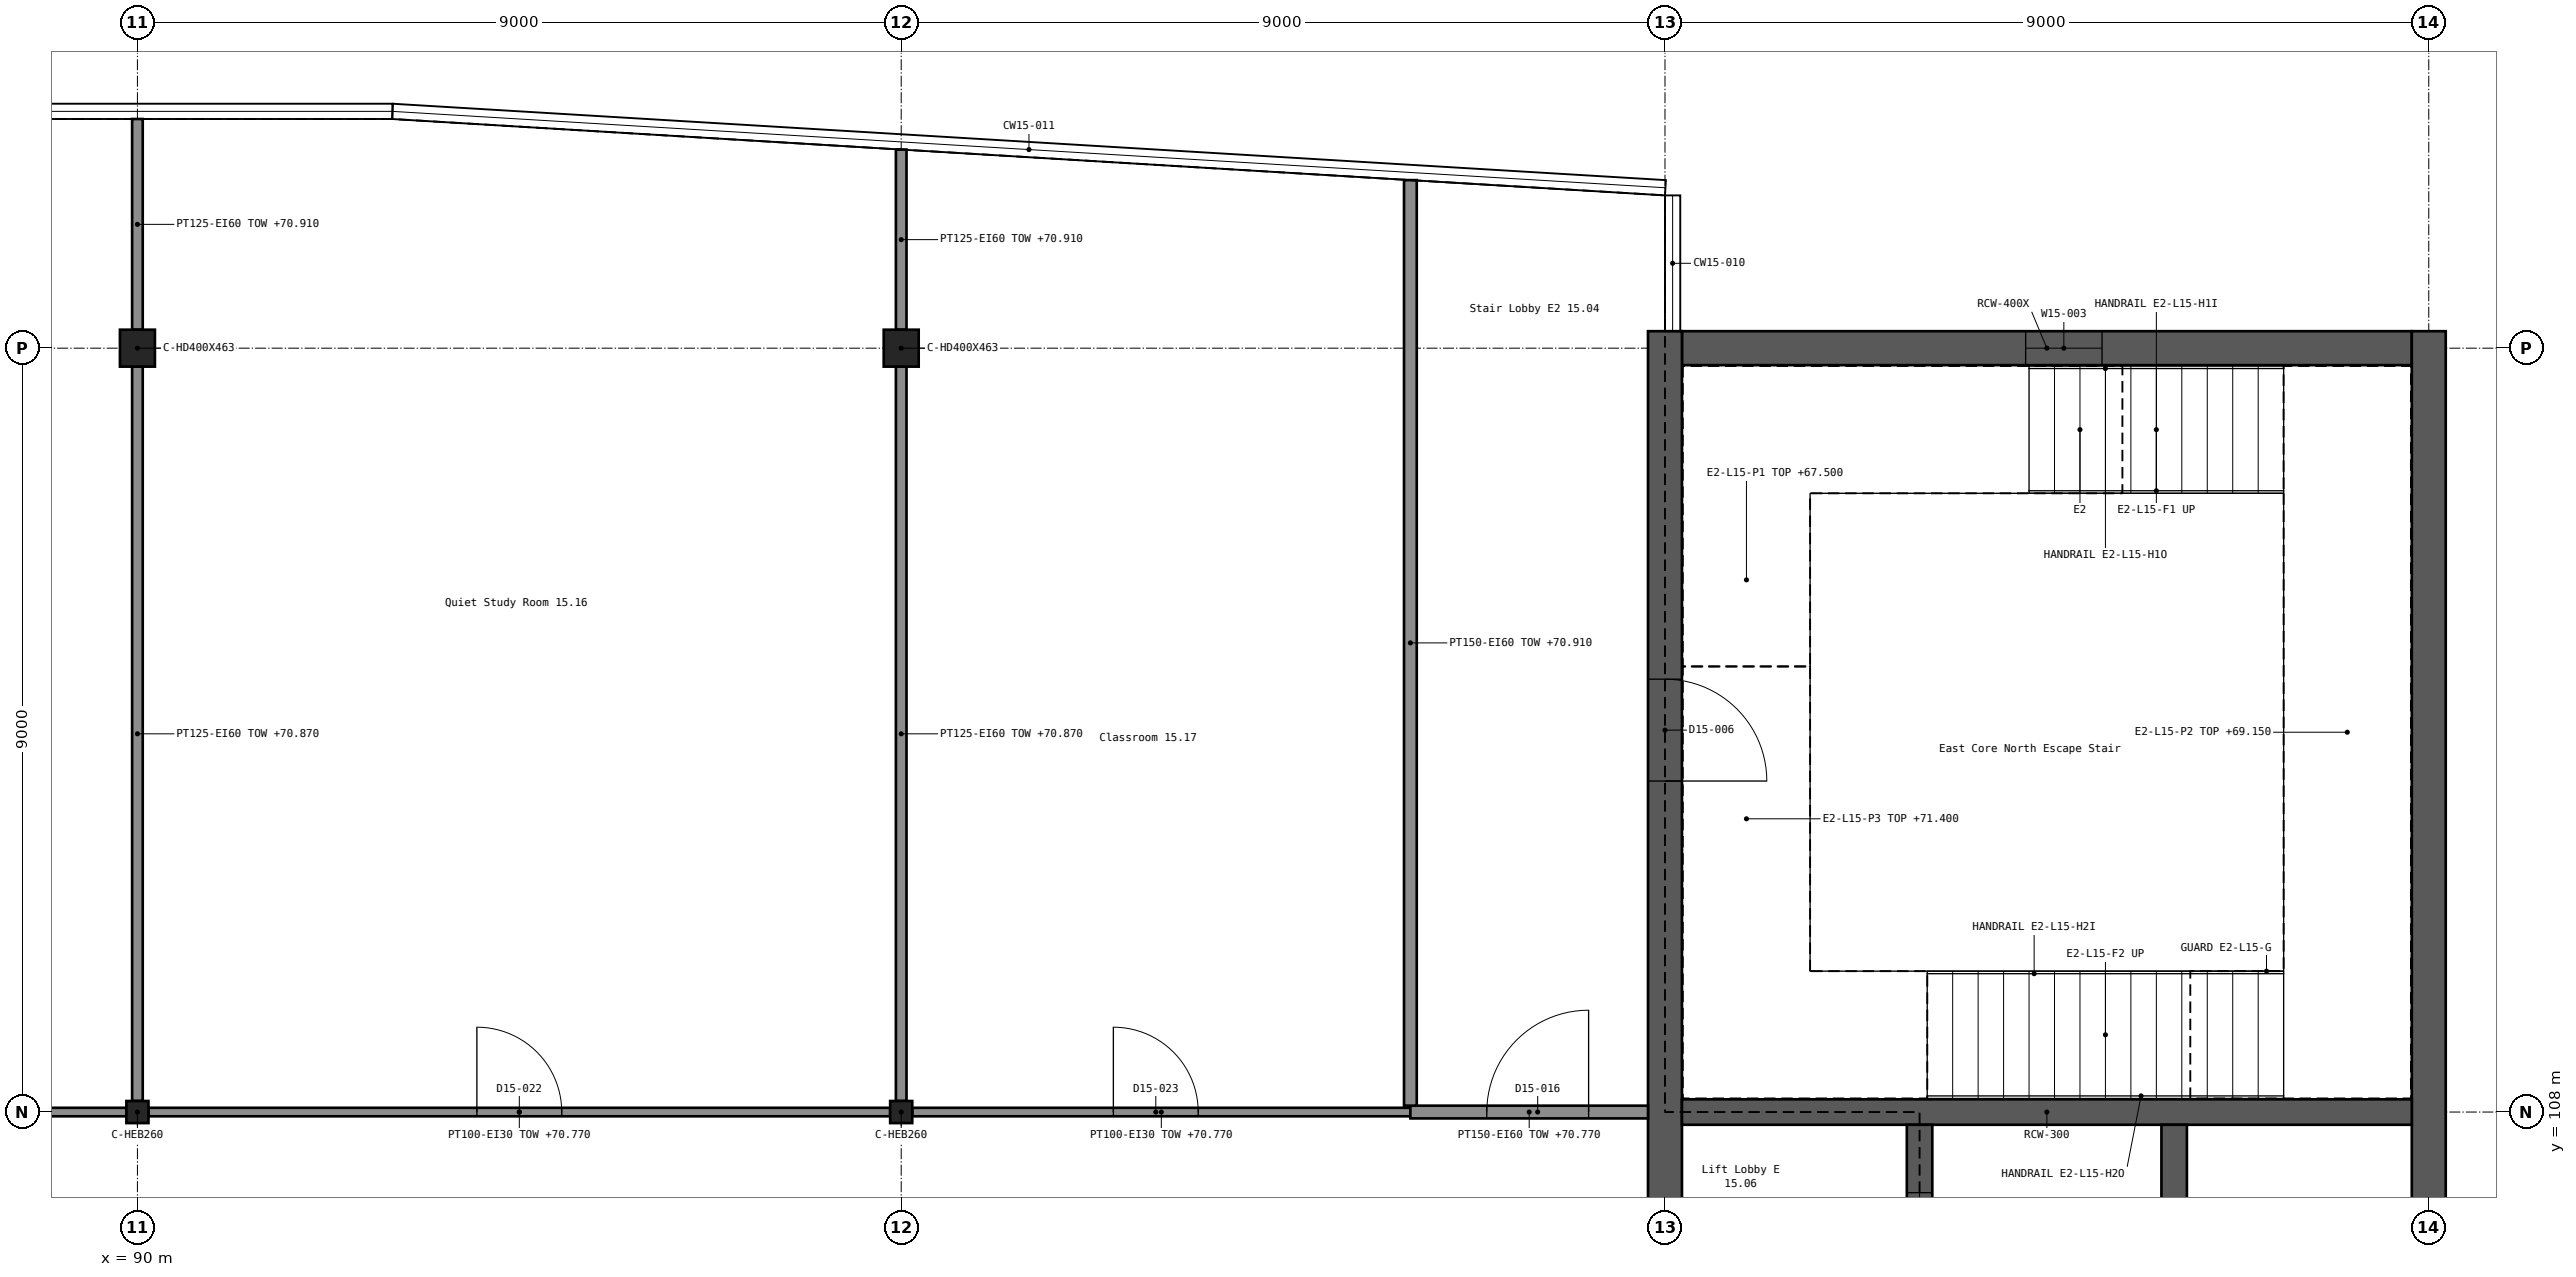
"""IFC4 building model, lengths in metres.
Left out: names, types, materials, properties, quantities, classifications, styles, units other than length and angle.
Written with IfcOpenShell. Run it as: python <this file> out.ifc"""

import sys

from ifc_helpers import new_model, si_unit, direction, frame, frame_2d, origin, origin_2d, place, context, subcontext, project, spatial, rectangle, i_section, extrude, element, fill, save


model = new_model("IFC4")
c1 = context("Model", 3, precision=1e-05, world=origin(), true_north=direction((0.0, 1.0)))
c2 = subcontext(c1, "Body", "Model", "MODEL_VIEW")
j1 = project(units=[si_unit("LENGTHUNIT", "METRE"), si_unit("PLANEANGLEUNIT", "RADIAN")], contexts=[c1])
p1 = place(None, origin())
s1 = spatial("IfcSite", under=j1, at=p1, CompositionType="ELEMENT")
p2 = place(p1, origin())
s2 = spatial("IfcBuilding", under=s1, at=p2, CompositionType="ELEMENT")
p3 = place(p2, frame((0.0, 0.0, 67.5)))
s3 = spatial("IfcBuildingStorey", under=s2, at=p3, CompositionType="ELEMENT", Elevation=67.5)
p4 = place(p3, frame((108.2, 117.0, 0.0), z_axis=(0.0, 0.0, 1.0), x_axis=(1.0, 0.0, 0.0)))
e1 = element("IfcWall", 1, at=p4, inside=s3, PredefinedType="SHEAR", context=c2, shape_type="SweptSolid", body=[
    extrude(rectangle(XDim=8.6, YDim=0.4, at=frame_2d((4.3, 0.0))), origin(), (0.0, 0.0, 1.0), 3.9),
])
p5 = place(p4, frame((4.05, 0.0, 1.2)))
e2 = element("IfcOpeningElement", 2, at=p5, cuts=e1, PredefinedType="OPENING", context=c2, shape_type="SweptSolid", body=[
    extrude(rectangle(XDim=0.9, YDim=1.5, at=frame_2d((0.45, 0.75))), frame((0.0, 0.211, 0.0), z_axis=(0.0, -1.0, 0.0), x_axis=(1.0, 0.0, 0.0)), (0.0, 0.0, 1.0), 0.422),
])
p6 = place(p3, frame((108.0, 89.8, 0.0), z_axis=(0.0, 0.0, 1.0), x_axis=(0.0, 1.0, 0.0)))
e3 = element("IfcWall", 3, at=p6, inside=s3, PredefinedType="SHEAR", context=c2, shape_type="SweptSolid", body=[
    extrude(rectangle(XDim=27.4, YDim=0.4, at=frame_2d((13.7, 0.0))), origin(), (0.0, 0.0, 1.0), 3.9),
])
p7 = place(p6, frame((4.1, 0.0, 0.0)))
e4 = element("IfcOpeningElement", 4, at=p7, cuts=e3, PredefinedType="OPENING", context=c2, shape_type="SweptSolid", body=[
    extrude(rectangle(XDim=1.2, YDim=2.1, at=frame_2d((0.6, 1.05))), frame((0.0, 0.211, 0.0), z_axis=(0.0, -1.0, 0.0), x_axis=(1.0, 0.0, 0.0)), (0.0, 0.0, 1.0), 0.422),
])
p8 = place(p6, frame((22.1, 0.0, 0.0)))
e5 = element("IfcOpeningElement", 5, at=p8, cuts=e3, PredefinedType="OPENING", context=c2, shape_type="SweptSolid", body=[
    extrude(rectangle(XDim=1.2, YDim=2.1, at=frame_2d((0.6, 1.05))), frame((0.0, 0.211, 0.0), z_axis=(0.0, -1.0, 0.0), x_axis=(1.0, 0.0, 0.0)), (0.0, 0.0, 1.0), 0.422),
])
p9 = place(p6, frame((12.5, 0.0, 0.0)))
e6 = element("IfcOpeningElement", 6, at=p9, cuts=e3, PredefinedType="OPENING", context=c2, shape_type="SweptSolid", body=[
    extrude(rectangle(XDim=2.0, YDim=2.1, at=frame_2d((1.0, 1.05))), frame((0.0, 0.211, 0.0), z_axis=(0.0, -1.0, 0.0), x_axis=(1.0, 0.0, 0.0)), (0.0, 0.0, 1.0), 0.422),
])
p10 = place(p3, frame((117.0, 89.8, 0.0), z_axis=(0.0, 0.0, 1.0), x_axis=(0.0, 1.0, 0.0)))
e7 = element("IfcWall", 7, at=p10, inside=s3, PredefinedType="SHEAR", context=c2, shape_type="SweptSolid", body=[
    extrude(rectangle(XDim=27.4, YDim=0.4, at=frame_2d((13.7, 0.0))), origin(), (0.0, 0.0, 1.0), 3.9),
])
p11 = place(p3, frame((108.2, 108.0, 0.0), z_axis=(0.0, 0.0, 1.0), x_axis=(1.0, 0.0, 0.0)))
e8 = element("IfcWall", 8, at=p11, inside=s3, PredefinedType="SHEAR", context=c2, shape_type="SweptSolid", body=[
    extrude(rectangle(XDim=8.6, YDim=0.3, at=frame_2d((4.3, 0.0))), origin(), (0.0, 0.0, 1.0), 3.9),
])
p12 = place(p3, frame((111.0, 99.15, 0.0), z_axis=(0.0, 0.0, 1.0), x_axis=(0.0, 1.0, 0.0)))
e9 = element("IfcWall", 9, at=p12, inside=s3, PredefinedType="SHEAR", context=c2, shape_type="SweptSolid", body=[
    extrude(rectangle(XDim=8.7, YDim=0.3, at=frame_2d((4.35, 0.0))), origin(), (0.0, 0.0, 1.0), 3.9),
])
p13 = place(p12, frame((0.8, 0.0, 0.0)))
e10 = element("IfcOpeningElement", 10, at=p13, cuts=e9, PredefinedType="OPENING", context=c2, shape_type="SweptSolid", body=[
    extrude(rectangle(XDim=1.1, YDim=2.1, at=frame_2d((0.55, 1.05))), frame((0.0, 0.161, 0.0), z_axis=(0.0, -1.0, 0.0), x_axis=(1.0, 0.0, 0.0)), (0.0, 0.0, 1.0), 0.322),
])
p14 = place(p12, frame((3.8, 0.0, 0.0)))
e11 = element("IfcOpeningElement", 11, at=p14, cuts=e9, PredefinedType="OPENING", context=c2, shape_type="SweptSolid", body=[
    extrude(rectangle(XDim=1.1, YDim=2.1, at=frame_2d((0.55, 1.05))), frame((0.0, 0.161, 0.0), z_axis=(0.0, -1.0, 0.0), x_axis=(1.0, 0.0, 0.0)), (0.0, 0.0, 1.0), 0.322),
])
p15 = place(p12, frame((6.8, 0.0, 0.0)))
e12 = element("IfcOpeningElement", 12, at=p15, cuts=e9, PredefinedType="OPENING", context=c2, shape_type="SweptSolid", body=[
    extrude(rectangle(XDim=1.1, YDim=2.1, at=frame_2d((0.55, 1.05))), frame((0.0, 0.161, 0.0), z_axis=(0.0, -1.0, 0.0), x_axis=(1.0, 0.0, 0.0)), (0.0, 0.0, 1.0), 0.322),
])
p16 = place(p3, frame((114.0, 99.15, 0.0), z_axis=(0.0, 0.0, 1.0), x_axis=(0.0, 1.0, 0.0)))
e13 = element("IfcWall", 13, at=p16, inside=s3, PredefinedType="SHEAR", context=c2, shape_type="SweptSolid", body=[
    extrude(rectangle(XDim=8.7, YDim=0.3, at=frame_2d((4.35, 0.0))), origin(), (0.0, 0.0, 1.0), 3.9),
])
for number, where, z_axis, x_axis in (
    (14, (90.0, 108.0, 0.0), (0.0, 0.0, 1.0), (1.0, 0.0, 0.0)),
    (15, (99.0, 108.0, 0.0), (0.0, 0.0, 1.0), (1.0, 0.0, 0.0)),
):
    element("IfcColumn", number, at=place(p3, frame(where, z_axis=z_axis, x_axis=x_axis)), inside=s3, PredefinedType="COLUMN", context=c2, shape_type="SweptSolid", body=[
        extrude(i_section(OverallWidth=0.26, OverallDepth=0.26, WebThickness=0.01, FlangeThickness=0.018, FilletRadius=0.024, at=origin_2d()), origin(), (0.0, 0.0, 1.0), 3.9),
    ])
for number, where, z_axis, x_axis in (
    (16, (90.0, 117.0, 0.0), (0.0, 0.0, 1.0), (1.0, 0.0, 0.0)),
    (17, (99.0, 117.0, 0.0), (0.0, 0.0, 1.0), (1.0, 0.0, 0.0)),
):
    element("IfcColumn", number, at=place(p3, frame(where, z_axis=z_axis, x_axis=x_axis)), inside=s3, PredefinedType="COLUMN", context=c2, shape_type="SweptSolid", body=[
        extrude(i_section(OverallWidth=0.412, OverallDepth=0.435, WebThickness=0.036, FlangeThickness=0.057, FilletRadius=0.015, at=origin_2d()), origin(), (0.0, 0.0, 1.0), 3.9),
    ])
p17 = place(p3, frame((81.13, 108.0, 0.0), z_axis=(0.0, 0.0, 1.0), x_axis=(1.0, 0.0, 0.0)))
e18 = element("IfcWall", 18, at=p17, inside=s3, PredefinedType="PARTITIONING", context=c2, shape_type="SweptSolid", body=[
    extrude(rectangle(XDim=8.74, YDim=0.1, at=frame_2d((4.37, 0.0))), origin(), (0.0, 0.0, 1.0), 3.27),
])
p18 = place(p17, frame((5.845, 0.0, 0.0)))
e19 = element("IfcOpeningElement", 19, at=p18, cuts=e18, PredefinedType="OPENING", context=c2, shape_type="SweptSolid", body=[
    extrude(rectangle(XDim=1.8, YDim=2.1, at=frame_2d((0.9, 1.05))), frame((0.0, 0.061, 0.0), z_axis=(0.0, -1.0, 0.0), x_axis=(1.0, 0.0, 0.0)), (0.0, 0.0, 1.0), 0.122),
])
p19 = place(p3, frame((90.13, 108.0, 0.0), z_axis=(0.0, 0.0, 1.0), x_axis=(1.0, 0.0, 0.0)))
e20 = element("IfcWall", 20, at=p19, inside=s3, PredefinedType="PARTITIONING", context=c2, shape_type="SweptSolid", body=[
    extrude(rectangle(XDim=8.74, YDim=0.1, at=frame_2d((4.37, 0.0))), origin(), (0.0, 0.0, 1.0), 3.27),
])
p20 = place(p19, frame((3.87, 0.0, 0.0)))
e21 = element("IfcOpeningElement", 21, at=p20, cuts=e20, PredefinedType="OPENING", context=c2, shape_type="SweptSolid", body=[
    extrude(rectangle(XDim=1.0, YDim=2.1, at=frame_2d((0.5, 1.05))), frame((0.0, 0.061, 0.0), z_axis=(0.0, -1.0, 0.0), x_axis=(1.0, 0.0, 0.0)), (0.0, 0.0, 1.0), 0.122),
])
p21 = place(p3, frame((99.13, 108.0, 0.0), z_axis=(0.0, 0.0, 1.0), x_axis=(1.0, 0.0, 0.0)))
e22 = element("IfcWall", 22, at=p21, inside=s3, PredefinedType="PARTITIONING", context=c2, shape_type="SweptSolid", body=[
    extrude(rectangle(XDim=5.87, YDim=0.1, at=frame_2d((2.935, 0.0))), origin(), (0.0, 0.0, 1.0), 3.27),
])
p22 = place(p21, frame((2.37, 0.0, 0.0)))
e23 = element("IfcOpeningElement", 23, at=p22, cuts=e22, PredefinedType="OPENING", context=c2, shape_type="SweptSolid", body=[
    extrude(rectangle(XDim=1.0, YDim=2.1, at=frame_2d((0.5, 1.05))), frame((0.0, 0.061, 0.0), z_axis=(0.0, -1.0, 0.0), x_axis=(1.0, 0.0, 0.0)), (0.0, 0.0, 1.0), 0.122),
])
p23 = place(p3, frame((105.0, 108.0, 0.0), z_axis=(0.0, 0.0, 1.0), x_axis=(1.0, 0.0, 0.0)))
e24 = element("IfcWall", 24, at=p23, inside=s3, PredefinedType="PARTITIONING", context=c2, shape_type="SweptSolid", body=[
    extrude(rectangle(XDim=2.8, YDim=0.15, at=frame_2d((1.4, 0.0))), origin(), (0.0, 0.0, 1.0), 3.27),
])
p24 = place(p23, frame((0.9, 0.0, 0.0)))
e25 = element("IfcOpeningElement", 25, at=p24, cuts=e24, PredefinedType="OPENING", context=c2, shape_type="SweptSolid", body=[
    extrude(rectangle(XDim=1.2, YDim=2.1, at=frame_2d((0.6, 1.05))), frame((0.0, 0.086, 0.0), z_axis=(0.0, -1.0, 0.0), x_axis=(1.0, 0.0, 0.0)), (0.0, 0.0, 1.0), 0.172),
])
p25 = place(p3, frame((90.0, 108.13, 0.0), z_axis=(0.0, 0.0, 1.0), x_axis=(0.0, 1.0, 0.0)))
e26 = element("IfcWall", 26, at=p25, inside=s3, PredefinedType="PARTITIONING", context=c2, shape_type="SweptSolid", body=[
    extrude(rectangle(XDim=8.653, YDim=0.125, at=frame_2d((4.326, 0.0))), origin(), (0.0, 0.0, 1.0), 3.37),
])
p26 = place(p3, frame((90.0, 117.218, 0.0), z_axis=(0.0, 0.0, 1.0), x_axis=(0.0, 1.0, 0.0)))
e27 = element("IfcWall", 27, at=p26, inside=s3, PredefinedType="PARTITIONING", context=c2, shape_type="SweptSolid", body=[
    extrude(rectangle(XDim=2.482, YDim=0.125, at=frame_2d((1.241, 0.0))), origin(), (0.0, 0.0, 1.0), 3.41),
])
p27 = place(p3, frame((99.0, 108.13, 0.0), z_axis=(0.0, 0.0, 1.0), x_axis=(0.0, 1.0, 0.0)))
e28 = element("IfcWall", 28, at=p27, inside=s3, PredefinedType="PARTITIONING", context=c2, shape_type="SweptSolid", body=[
    extrude(rectangle(XDim=8.653, YDim=0.125, at=frame_2d((4.326, 0.0))), origin(), (0.0, 0.0, 1.0), 3.37),
])
p28 = place(p3, frame((99.0, 117.218, 0.0), z_axis=(0.0, 0.0, 1.0), x_axis=(0.0, 1.0, 0.0)))
e29 = element("IfcWall", 29, at=p28, inside=s3, PredefinedType="PARTITIONING", context=c2, shape_type="SweptSolid", body=[
    extrude(rectangle(XDim=2.123, YDim=0.125, at=frame_2d((1.061, 0.0))), origin(), (0.0, 0.0, 1.0), 3.41),
])
p29 = place(p3, frame((105.0, 108.075, 0.0), z_axis=(0.0, 0.0, 1.0), x_axis=(0.0, 1.0, 0.0)))
e30 = element("IfcWall", 30, at=p29, inside=s3, PredefinedType="PARTITIONING", context=c2, shape_type="SweptSolid", body=[
    extrude(rectangle(XDim=10.905, YDim=0.15, at=frame_2d((5.453, 0.0))), origin(), (0.0, 0.0, 1.0), 3.41),
])
p30 = place(p5, origin())
e31 = element("IfcWindow", 31, at=p30, inside=s3, PartitioningType="SINGLE_PANEL", PredefinedType="WINDOW", context=c2, shape_type="SweptSolid", body=[
    extrude(rectangle(XDim=0.9, YDim=1.5, at=frame_2d((0.45, 0.75))), frame((0.0, 0.03, 0.0), z_axis=(0.0, -1.0, 0.0), x_axis=(1.0, 0.0, 0.0)), (0.0, 0.0, 1.0), 0.06),
])
fill(e2, e31)
p31 = place(p8, frame((1.2, 0.0, 0.0), z_axis=(0.0, 0.0, 1.0), x_axis=(-1.0, 0.0, 0.0)))
e32 = element("IfcDoor", 32, at=p31, inside=s3, OperationType="SINGLE_SWING_RIGHT", PredefinedType="DOOR", context=c2, shape_type="SweptSolid", body=[
    extrude(rectangle(XDim=1.2, YDim=2.1, at=frame_2d((0.6, 1.05))), frame((0.0, 0.025, 0.0), z_axis=(0.0, -1.0, 0.0), x_axis=(1.0, 0.0, 0.0)), (0.0, 0.0, 1.0), 0.05),
])
fill(e5, e32)
p32 = place(p15, origin())
e33 = element("IfcDoor", 33, at=p32, inside=s3, OperationType="DOUBLE_DOOR_SLIDING", PredefinedType="DOOR", context=c2, shape_type="SweptSolid", body=[
    extrude(rectangle(XDim=1.1, YDim=2.1, at=frame_2d((0.55, 1.05))), frame((0.0, 0.025, 0.0), z_axis=(0.0, -1.0, 0.0), x_axis=(1.0, 0.0, 0.0)), (0.0, 0.0, 1.0), 0.05),
])
fill(e12, e33)
p33 = place(p24, origin())
e34 = element("IfcDoor", 34, at=p33, inside=s3, OperationType="SINGLE_SWING_RIGHT", PredefinedType="DOOR", context=c2, shape_type="SweptSolid", body=[
    extrude(rectangle(XDim=1.2, YDim=2.1, at=frame_2d((0.6, 1.05))), frame((0.0, 0.025, 0.0), z_axis=(0.0, -1.0, 0.0), x_axis=(1.0, 0.0, 0.0)), (0.0, 0.0, 1.0), 0.05),
])
fill(e25, e34)
p34 = place(p20, origin())
e35 = element("IfcDoor", 35, at=p34, inside=s3, OperationType="SINGLE_SWING_LEFT", PredefinedType="DOOR", context=c2, shape_type="SweptSolid", body=[
    extrude(rectangle(XDim=1.0, YDim=2.1, at=frame_2d((0.5, 1.05))), frame((0.0, 0.025, 0.0), z_axis=(0.0, -1.0, 0.0), x_axis=(1.0, 0.0, 0.0)), (0.0, 0.0, 1.0), 0.05),
])
fill(e21, e35)
p35 = place(p22, origin())
e36 = element("IfcDoor", 36, at=p35, inside=s3, OperationType="SINGLE_SWING_LEFT", PredefinedType="DOOR", context=c2, shape_type="SweptSolid", body=[
    extrude(rectangle(XDim=1.0, YDim=2.1, at=frame_2d((0.5, 1.05))), frame((0.0, 0.025, 0.0), z_axis=(0.0, -1.0, 0.0), x_axis=(1.0, 0.0, 0.0)), (0.0, 0.0, 1.0), 0.05),
])
fill(e23, e36)
save(model, sys.argv[1])
